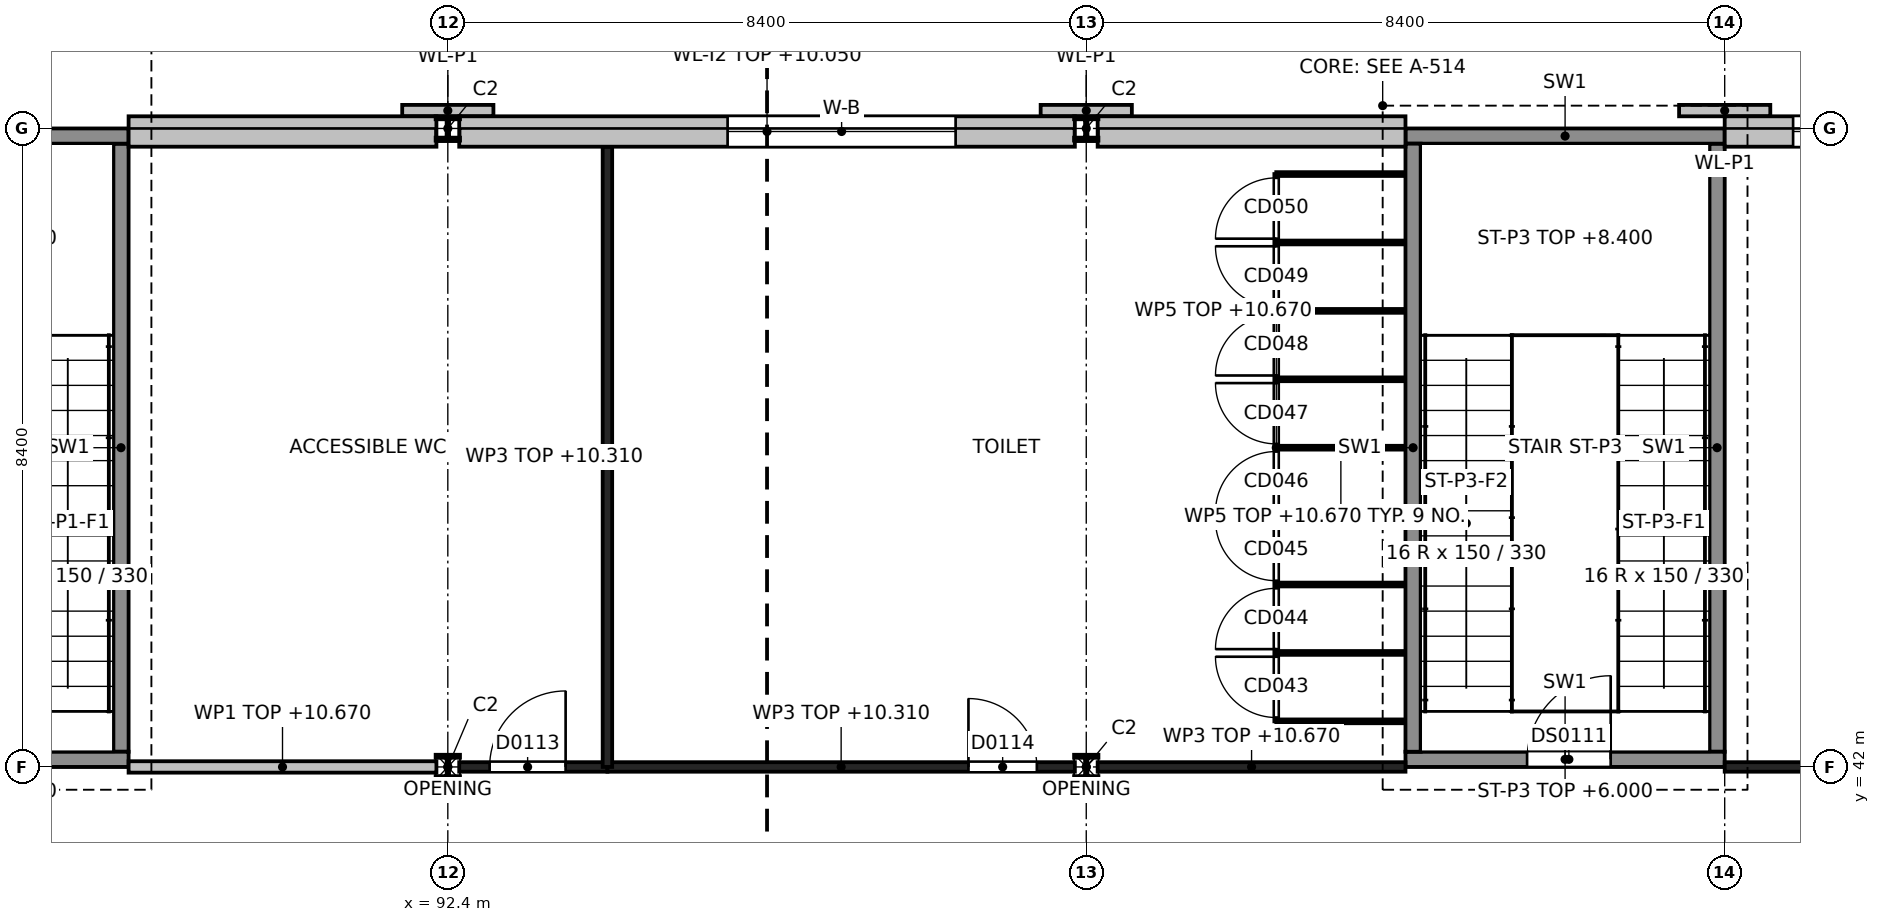
"""IFC4 building model, lengths in metres.
Left out: names, types, materials, properties, quantities, classifications, styles, units other than length and angle.
Written with IfcOpenShell. Run it as: python <this file> out.ifc"""

import sys

from ifc_helpers import new_model, si_unit, direction, frame, frame_2d, origin, origin_2d, place, context, subcontext, project, spatial, rectangle, i_section, extrude, element, fill, save


model = new_model("IFC4")
c1 = context("Model", 3, precision=1e-05, world=origin(), true_north=direction((0.0, 1.0)))
c2 = subcontext(c1, "Body", "Model", "MODEL_VIEW")
j1 = project(units=[si_unit("LENGTHUNIT", "METRE"), si_unit("PLANEANGLEUNIT", "RADIAN")], contexts=[c1])
p1 = place(None, origin())
s1 = spatial("IfcSite", under=j1, at=p1, CompositionType="ELEMENT")
p2 = place(p1, origin())
s2 = spatial("IfcBuilding", under=s1, at=p2, CompositionType="ELEMENT")
p3 = place(p2, frame((0.0, 0.0, 6.0)))
s3 = spatial("IfcBuildingStorey", under=s2, at=p3, CompositionType="ELEMENT", Elevation=6.0)
for number, where, z_axis, x_axis in (
    (1, (92.4, 42.0, 0.0), (0.0, 0.0, 1.0), (1.0, 0.0, 0.0)),
    (2, (92.4, 50.4, 0.0), (0.0, 0.0, 1.0), (1.0, 0.0, 0.0)),
    (3, (100.8, 42.0, 0.0), (0.0, 0.0, 1.0), (1.0, 0.0, 0.0)),
    (4, (100.8, 50.4, 0.0), (0.0, 0.0, 1.0), (1.0, 0.0, 0.0)),
):
    element("IfcColumn", number, at=place(p3, frame(where, z_axis=z_axis, x_axis=x_axis)), inside=s3, PredefinedType="COLUMN", context=c2, shape_type="SweptSolid", body=[
        extrude(i_section(OverallWidth=0.3, OverallDepth=0.3, WebThickness=0.011, FlangeThickness=0.019, at=origin_2d()), origin(), (0.0, 0.0, 1.0), 4.8),
    ])
p4 = place(p3, frame((84.0, 42.1, 0.0), z_axis=(0.0, 0.0, 1.0), x_axis=(1.0, 0.0, 0.0)))
e5 = element("IfcWall", 5, at=p4, inside=s3, PredefinedType="SHEAR", context=c2, shape_type="SweptSolid", body=[
    extrude(rectangle(XDim=4.2, YDim=0.2, at=frame_2d((2.1, 0.0))), origin(), (0.0, 0.0, 1.0), 4.8),
])
p5 = place(p4, frame((1.6, 0.0, 0.0)))
e6 = element("IfcOpeningElement", 6, at=p5, cuts=e5, PredefinedType="OPENING", context=c2, shape_type="SweptSolid", body=[
    extrude(rectangle(XDim=1.1, YDim=2.1, at=frame_2d((0.55, 1.05))), frame((0.0, 0.1, 0.0), z_axis=(0.0, -1.0, 0.0), x_axis=(1.0, 0.0, 0.0)), (0.0, 0.0, 1.0), 0.2),
])
p6 = place(p3, frame((84.0, 50.3, 0.0), z_axis=(0.0, 0.0, 1.0), x_axis=(1.0, 0.0, 0.0)))
e7 = element("IfcWall", 7, at=p6, inside=s3, PredefinedType="SHEAR", context=c2, shape_type="SweptSolid", body=[
    extrude(rectangle(XDim=4.2, YDim=0.2, at=frame_2d((2.1, 0.0))), origin(), (0.0, 0.0, 1.0), 4.8),
])
p7 = place(p3, frame((88.1, 42.2, 0.0), z_axis=(0.0, 0.0, 1.0), x_axis=(0.0, 1.0, 0.0)))
e8 = element("IfcWall", 8, at=p7, inside=s3, PredefinedType="SHEAR", context=c2, shape_type="SweptSolid", body=[
    extrude(rectangle(XDim=8.0, YDim=0.2, at=frame_2d((4.0, 0.0))), origin(), (0.0, 0.0, 1.0), 4.8),
])
p8 = place(p3, frame((105.0, 42.1, 0.0), z_axis=(0.0, 0.0, 1.0), x_axis=(1.0, 0.0, 0.0)))
e9 = element("IfcWall", 9, at=p8, inside=s3, PredefinedType="SHEAR", context=c2, shape_type="SweptSolid", body=[
    extrude(rectangle(XDim=4.2, YDim=0.2, at=frame_2d((2.1, 0.0))), origin(), (0.0, 0.0, 1.0), 4.8),
])
p9 = place(p8, frame((1.6, 0.0, 0.0)))
e10 = element("IfcOpeningElement", 10, at=p9, cuts=e9, PredefinedType="OPENING", context=c2, shape_type="SweptSolid", body=[
    extrude(rectangle(XDim=1.1, YDim=2.1, at=frame_2d((0.55, 1.05))), frame((0.0, 0.1, 0.0), z_axis=(0.0, -1.0, 0.0), x_axis=(1.0, 0.0, 0.0)), (0.0, 0.0, 1.0), 0.2),
])
p10 = place(p3, frame((105.0, 50.3, 0.0), z_axis=(0.0, 0.0, 1.0), x_axis=(1.0, 0.0, 0.0)))
e11 = element("IfcWall", 11, at=p10, inside=s3, PredefinedType="SHEAR", context=c2, shape_type="SweptSolid", body=[
    extrude(rectangle(XDim=4.2, YDim=0.2, at=frame_2d((2.1, 0.0))), origin(), (0.0, 0.0, 1.0), 4.8),
])
for number, where, z_axis, x_axis in (
    (12, (105.1, 42.2, 0.0), (0.0, 0.0, 1.0), (0.0, 1.0, 0.0)),
    (13, (109.1, 42.2, 0.0), (0.0, 0.0, 1.0), (0.0, 1.0, 0.0)),
):
    element("IfcWall", number, at=place(p3, frame(where, z_axis=z_axis, x_axis=x_axis)), inside=s3, PredefinedType="SHEAR", context=c2, shape_type="SweptSolid", body=[
        extrude(rectangle(XDim=8.0, YDim=0.2, at=frame_2d((4.0, 0.0))), origin(), (0.0, 0.0, 1.0), 4.8),
    ])
p11 = place(p3, frame((88.2, 50.36, 0.0), z_axis=(0.0, 0.0, 1.0), x_axis=(1.0, 0.0, 0.0)))
e14 = element("IfcWall", 14, at=p11, inside=s3, PredefinedType="SOLIDWALL", context=c2, shape_type="SweptSolid", body=[
    extrude(rectangle(XDim=4.05, YDim=0.4, at=frame_2d((2.025, 0.0))), origin(), (0.0, 0.0, 1.0), 4.05),
])
p12 = place(p3, frame((92.55, 50.36, 0.0), z_axis=(0.0, 0.0, 1.0), x_axis=(1.0, 0.0, 0.0)))
e15 = element("IfcWall", 15, at=p12, inside=s3, PredefinedType="SOLIDWALL", context=c2, shape_type="SweptSolid", body=[
    extrude(rectangle(XDim=8.1, YDim=0.4, at=frame_2d((4.05, 0.0))), origin(), (0.0, 0.0, 1.0), 4.05),
])
p13 = place(p12, frame((3.531, 0.0, 0.9)))
e16 = element("IfcOpeningElement", 16, at=p13, cuts=e15, PredefinedType="OPENING", context=c2, shape_type="SweptSolid", body=[
    extrude(rectangle(XDim=3.0, YDim=3.0, at=frame_2d((1.5, 1.5))), frame((0.0, 0.2, 0.0), z_axis=(0.0, -1.0, 0.0), x_axis=(1.0, 0.0, 0.0)), (0.0, 0.0, 1.0), 0.4),
])
p14 = place(p3, frame((100.95, 50.36, 0.0), z_axis=(0.0, 0.0, 1.0), x_axis=(1.0, 0.0, 0.0)))
e17 = element("IfcWall", 17, at=p14, inside=s3, PredefinedType="SOLIDWALL", context=c2, shape_type="SweptSolid", body=[
    extrude(rectangle(XDim=4.05, YDim=0.4, at=frame_2d((2.025, 0.0))), origin(), (0.0, 0.0, 1.0), 4.05),
])
p15 = place(p3, frame((109.2, 50.36, 0.0), z_axis=(0.0, 0.0, 1.0), x_axis=(1.0, 0.0, 0.0)))
e18 = element("IfcWall", 18, at=p15, inside=s3, PredefinedType="SOLIDWALL", context=c2, shape_type="SweptSolid", body=[
    extrude(rectangle(XDim=8.25, YDim=0.4, at=frame_2d((4.125, 0.0))), origin(), (0.0, 0.0, 1.0), 4.05),
])
p16 = place(p15, frame((0.9, 0.0, 0.9)))
e19 = element("IfcOpeningElement", 19, at=p16, cuts=e18, PredefinedType="OPENING", context=c2, shape_type="SweptSolid", body=[
    extrude(rectangle(XDim=3.0, YDim=3.0, at=frame_2d((1.5, 1.5))), frame((0.0, 0.2, 0.0), z_axis=(0.0, -1.0, 0.0), x_axis=(1.0, 0.0, 0.0)), (0.0, 0.0, 1.0), 0.4),
])
p17 = place(p15, frame((4.5, 0.0, 0.9)))
e20 = element("IfcOpeningElement", 20, at=p17, cuts=e18, PredefinedType="OPENING", context=c2, shape_type="SweptSolid", body=[
    extrude(rectangle(XDim=3.0, YDim=3.0, at=frame_2d((1.5, 1.5))), frame((0.0, 0.2, 0.0), z_axis=(0.0, -1.0, 0.0), x_axis=(1.0, 0.0, 0.0)), (0.0, 0.0, 1.0), 0.4),
])
for number, where, z_axis, x_axis in (
    (21, (91.8, 50.635, 0.0), (0.0, 0.0, 1.0), (1.0, 0.0, 0.0)),
    (22, (100.2, 50.635, 0.0), (0.0, 0.0, 1.0), (1.0, 0.0, 0.0)),
    (23, (108.6, 50.635, 0.0), (0.0, 0.0, 1.0), (1.0, 0.0, 0.0)),
):
    element("IfcWall", number, at=place(p3, frame(where, z_axis=z_axis, x_axis=x_axis)), inside=s3, PredefinedType="SOLIDWALL", context=c2, shape_type="SweptSolid", body=[
        extrude(rectangle(XDim=1.2, YDim=0.15, at=frame_2d((0.6, 0.0))), origin(), (0.0, 0.0, 1.0), 4.8),
    ])
p18 = place(p3, frame((88.2, 42.0, 0.0), z_axis=(0.0, 0.0, 1.0), x_axis=(1.0, 0.0, 0.0)))
e24 = element("IfcWall", 24, at=p18, inside=s3, PredefinedType="PARTITIONING", context=c2, shape_type="SweptSolid", body=[
    extrude(rectangle(XDim=4.05, YDim=0.15, at=frame_2d((2.025, 0.0))), origin(), (0.0, 0.0, 1.0), 4.67),
])
p19 = place(p3, frame((92.55, 42.0, 0.0), z_axis=(0.0, 0.0, 1.0), x_axis=(1.0, 0.0, 0.0)))
e25 = element("IfcWall", 25, at=p19, inside=s3, PredefinedType="PARTITIONING", context=c2, shape_type="SweptSolid", body=[
    extrude(rectangle(XDim=1.95, YDim=0.125, at=frame_2d((0.975, 0.0))), origin(), (0.0, 0.0, 1.0), 4.31),
])
p20 = place(p19, frame((0.4, 0.0, 0.0)))
e26 = element("IfcOpeningElement", 26, at=p20, cuts=e25, PredefinedType="OPENING", context=c2, shape_type="SweptSolid", body=[
    extrude(rectangle(XDim=1.0, YDim=2.1, at=frame_2d((0.5, 1.05))), frame((0.0, 0.062, 0.0), z_axis=(0.0, -1.0, 0.0), x_axis=(1.0, 0.0, 0.0)), (0.0, 0.0, 1.0), 0.125),
])
p21 = place(p3, frame((94.5, 42.0, 0.0), z_axis=(0.0, 0.0, 1.0), x_axis=(1.0, 0.0, 0.0)))
e27 = element("IfcWall", 27, at=p21, inside=s3, PredefinedType="PARTITIONING", context=c2, shape_type="SweptSolid", body=[
    extrude(rectangle(XDim=6.15, YDim=0.125, at=frame_2d((3.075, 0.0))), origin(), (0.0, 0.0, 1.0), 4.31),
])
p22 = place(p21, frame((4.75, 0.0, 0.0)))
e28 = element("IfcOpeningElement", 28, at=p22, cuts=e27, PredefinedType="OPENING", context=c2, shape_type="SweptSolid", body=[
    extrude(rectangle(XDim=0.9, YDim=2.1, at=frame_2d((0.45, 1.05))), frame((0.0, 0.062, 0.0), z_axis=(0.0, -1.0, 0.0), x_axis=(1.0, 0.0, 0.0)), (0.0, 0.0, 1.0), 0.125),
])
p23 = place(p3, frame((100.95, 42.0, 0.0), z_axis=(0.0, 0.0, 1.0), x_axis=(1.0, 0.0, 0.0)))
e29 = element("IfcWall", 29, at=p23, inside=s3, PredefinedType="PARTITIONING", context=c2, shape_type="SweptSolid", body=[
    extrude(rectangle(XDim=4.05, YDim=0.125, at=frame_2d((2.025, 0.0))), origin(), (0.0, 0.0, 1.0), 4.67),
])
p24 = place(p3, frame((109.2, 42.0, 0.0), z_axis=(0.0, 0.0, 1.0), x_axis=(1.0, 0.0, 0.0)))
e30 = element("IfcWall", 30, at=p24, inside=s3, PredefinedType="PARTITIONING", context=c2, shape_type="SweptSolid", body=[
    extrude(rectangle(XDim=8.25, YDim=0.125, at=frame_2d((4.125, 0.0))), origin(), (0.0, 0.0, 1.0), 4.28),
])
p25 = place(p24, frame((3.25, 0.0, 0.0)))
e31 = element("IfcOpeningElement", 31, at=p25, cuts=e30, PredefinedType="OPENING", context=c2, shape_type="SweptSolid", body=[
    extrude(rectangle(XDim=1.8, YDim=2.1, at=frame_2d((0.9, 1.05))), frame((0.0, 0.062, 0.0), z_axis=(0.0, -1.0, 0.0), x_axis=(1.0, 0.0, 0.0)), (0.0, 0.0, 1.0), 0.125),
])
p26 = place(p3, frame((94.5, 42.0, 0.0), z_axis=(0.0, 0.0, 1.0), x_axis=(0.0, 1.0, 0.0)))
e32 = element("IfcWall", 32, at=p26, inside=s3, PredefinedType="PARTITIONING", context=c2, shape_type="SweptSolid", body=[
    extrude(rectangle(XDim=8.159, YDim=0.125, at=frame_2d((4.08, 0.0))), origin(), (0.0, 0.0, 1.0), 4.31),
])
p27 = place(p3, frame((103.3, 42.6, 0.0), z_axis=(0.0, 0.0, 1.0), x_axis=(0.0, 1.0, 0.0)))
e33 = element("IfcWall", 33, at=p27, inside=s3, PredefinedType="PARTITIONING", context=c2, shape_type="SweptSolid", body=[
    extrude(rectangle(XDim=7.2, YDim=0.05, at=frame_2d((3.6, 0.0))), origin(), (0.0, 0.0, 1.0), 4.67),
])
p28 = place(p27, frame((0.05, 0.0, 0.0)))
e34 = element("IfcOpeningElement", 34, at=p28, cuts=e33, PredefinedType="OPENING", context=c2, shape_type="SweptSolid", body=[
    extrude(rectangle(XDim=0.8, YDim=2.0, at=frame_2d((0.4, 1.0))), frame((0.0, 0.025, 0.0), z_axis=(0.0, -1.0, 0.0), x_axis=(1.0, 0.0, 0.0)), (0.0, 0.0, 1.0), 0.05),
])
p29 = place(p27, frame((0.95, 0.0, 0.0)))
e35 = element("IfcOpeningElement", 35, at=p29, cuts=e33, PredefinedType="OPENING", context=c2, shape_type="SweptSolid", body=[
    extrude(rectangle(XDim=0.8, YDim=2.0, at=frame_2d((0.4, 1.0))), frame((0.0, 0.025, 0.0), z_axis=(0.0, -1.0, 0.0), x_axis=(1.0, 0.0, 0.0)), (0.0, 0.0, 1.0), 0.05),
])
p30 = place(p27, frame((1.85, 0.0, 0.0)))
e36 = element("IfcOpeningElement", 36, at=p30, cuts=e33, PredefinedType="OPENING", context=c2, shape_type="SweptSolid", body=[
    extrude(rectangle(XDim=0.8, YDim=2.0, at=frame_2d((0.4, 1.0))), frame((0.0, 0.025, 0.0), z_axis=(0.0, -1.0, 0.0), x_axis=(1.0, 0.0, 0.0)), (0.0, 0.0, 1.0), 0.05),
])
p31 = place(p27, frame((2.75, 0.0, 0.0)))
e37 = element("IfcOpeningElement", 37, at=p31, cuts=e33, PredefinedType="OPENING", context=c2, shape_type="SweptSolid", body=[
    extrude(rectangle(XDim=0.8, YDim=2.0, at=frame_2d((0.4, 1.0))), frame((0.0, 0.025, 0.0), z_axis=(0.0, -1.0, 0.0), x_axis=(1.0, 0.0, 0.0)), (0.0, 0.0, 1.0), 0.05),
])
p32 = place(p27, frame((3.65, 0.0, 0.0)))
e38 = element("IfcOpeningElement", 38, at=p32, cuts=e33, PredefinedType="OPENING", context=c2, shape_type="SweptSolid", body=[
    extrude(rectangle(XDim=0.8, YDim=2.0, at=frame_2d((0.4, 1.0))), frame((0.0, 0.025, 0.0), z_axis=(0.0, -1.0, 0.0), x_axis=(1.0, 0.0, 0.0)), (0.0, 0.0, 1.0), 0.05),
])
p33 = place(p27, frame((4.55, 0.0, 0.0)))
e39 = element("IfcOpeningElement", 39, at=p33, cuts=e33, PredefinedType="OPENING", context=c2, shape_type="SweptSolid", body=[
    extrude(rectangle(XDim=0.8, YDim=2.0, at=frame_2d((0.4, 1.0))), frame((0.0, 0.025, 0.0), z_axis=(0.0, -1.0, 0.0), x_axis=(1.0, 0.0, 0.0)), (0.0, 0.0, 1.0), 0.05),
])
p34 = place(p27, frame((5.45, 0.0, 0.0)))
e40 = element("IfcOpeningElement", 40, at=p34, cuts=e33, PredefinedType="OPENING", context=c2, shape_type="SweptSolid", body=[
    extrude(rectangle(XDim=0.8, YDim=2.0, at=frame_2d((0.4, 1.0))), frame((0.0, 0.025, 0.0), z_axis=(0.0, -1.0, 0.0), x_axis=(1.0, 0.0, 0.0)), (0.0, 0.0, 1.0), 0.05),
])
p35 = place(p27, frame((6.35, 0.0, 0.0)))
e41 = element("IfcOpeningElement", 41, at=p35, cuts=e33, PredefinedType="OPENING", context=c2, shape_type="SweptSolid", body=[
    extrude(rectangle(XDim=0.8, YDim=2.0, at=frame_2d((0.4, 1.0))), frame((0.0, 0.025, 0.0), z_axis=(0.0, -1.0, 0.0), x_axis=(1.0, 0.0, 0.0)), (0.0, 0.0, 1.0), 0.05),
])
for number, where, z_axis, x_axis in (
    (42, (105.0, 42.6, 0.0), (0.0, 0.0, 1.0), (-1.0, 0.0, 0.0)),
    (43, (105.0, 43.5, 0.0), (0.0, 0.0, 1.0), (-1.0, 0.0, 0.0)),
    (44, (105.0, 44.4, 0.0), (0.0, 0.0, 1.0), (-1.0, 0.0, 0.0)),
    (45, (105.0, 45.3, 0.0), (0.0, 0.0, 1.0), (-1.0, 0.0, 0.0)),
    (46, (105.0, 46.2, 0.0), (0.0, 0.0, 1.0), (-1.0, 0.0, 0.0)),
    (47, (105.0, 47.1, 0.0), (0.0, 0.0, 1.0), (-1.0, 0.0, 0.0)),
    (48, (105.0, 48.0, 0.0), (0.0, 0.0, 1.0), (-1.0, 0.0, 0.0)),
    (49, (105.0, 48.9, 0.0), (0.0, 0.0, 1.0), (-1.0, 0.0, 0.0)),
    (50, (105.0, 49.8, 0.0), (0.0, 0.0, 1.0), (-1.0, 0.0, 0.0)),
):
    element("IfcWall", number, at=place(p3, frame(where, z_axis=z_axis, x_axis=x_axis)), inside=s3, PredefinedType="PARTITIONING", context=c2, shape_type="SweptSolid", body=[
        extrude(rectangle(XDim=1.7, YDim=0.05, at=frame_2d((0.85, 0.0))), origin(), (0.0, 0.0, 1.0), 4.67),
    ])
p36 = place(p13, origin())
e51 = element("IfcWindow", 51, at=p36, inside=s3, PartitioningType="SINGLE_PANEL", PredefinedType="WINDOW", context=c2, shape_type="SweptSolid", body=[
    extrude(rectangle(XDim=3.0, YDim=3.0, at=frame_2d((1.5, 1.5))), frame((0.0, 0.03, 0.0), z_axis=(0.0, -1.0, 0.0), x_axis=(1.0, 0.0, 0.0)), (0.0, 0.0, 1.0), 0.06),
])
fill(e16, e51)
p37 = place(p16, origin())
e52 = element("IfcWindow", 52, at=p37, inside=s3, PartitioningType="SINGLE_PANEL", PredefinedType="WINDOW", context=c2, shape_type="SweptSolid", body=[
    extrude(rectangle(XDim=3.0, YDim=3.0, at=frame_2d((1.5, 1.5))), frame((0.0, 0.03, 0.0), z_axis=(0.0, -1.0, 0.0), x_axis=(1.0, 0.0, 0.0)), (0.0, 0.0, 1.0), 0.06),
])
fill(e19, e52)
p38 = place(p20, origin())
e53 = element("IfcDoor", 53, at=p38, inside=s3, OperationType="SINGLE_SWING_RIGHT", PredefinedType="DOOR", context=c2, shape_type="SweptSolid", body=[
    extrude(rectangle(XDim=1.0, YDim=2.1, at=frame_2d((0.5, 1.05))), frame((0.0, 0.025, 0.0), z_axis=(0.0, -1.0, 0.0), x_axis=(1.0, 0.0, 0.0)), (0.0, 0.0, 1.0), 0.05),
])
fill(e26, e53)
p39 = place(p22, origin())
e54 = element("IfcDoor", 54, at=p39, inside=s3, OperationType="SINGLE_SWING_LEFT", PredefinedType="DOOR", context=c2, shape_type="SweptSolid", body=[
    extrude(rectangle(XDim=0.9, YDim=2.1, at=frame_2d((0.45, 1.05))), frame((0.0, 0.025, 0.0), z_axis=(0.0, -1.0, 0.0), x_axis=(1.0, 0.0, 0.0)), (0.0, 0.0, 1.0), 0.05),
])
fill(e28, e54)
p40 = place(p9, origin())
e55 = element("IfcDoor", 55, at=p40, inside=s3, OperationType="SINGLE_SWING_RIGHT", PredefinedType="DOOR", context=c2, shape_type="SweptSolid", body=[
    extrude(rectangle(XDim=1.1, YDim=2.1, at=frame_2d((0.55, 1.05))), frame((0.0, 0.025, 0.0), z_axis=(0.0, -1.0, 0.0), x_axis=(1.0, 0.0, 0.0)), (0.0, 0.0, 1.0), 0.05),
])
fill(e10, e55)
p41 = place(p28, origin())
e56 = element("IfcDoor", 56, at=p41, inside=s3, OperationType="SINGLE_SWING_RIGHT", PredefinedType="DOOR", context=c2, shape_type="SweptSolid", body=[
    extrude(rectangle(XDim=0.8, YDim=2.0, at=frame_2d((0.4, 1.0))), frame((0.0, 0.025, 0.0), z_axis=(0.0, -1.0, 0.0), x_axis=(1.0, 0.0, 0.0)), (0.0, 0.0, 1.0), 0.05),
])
fill(e34, e56)
p42 = place(p29, origin())
e57 = element("IfcDoor", 57, at=p42, inside=s3, OperationType="SINGLE_SWING_LEFT", PredefinedType="DOOR", context=c2, shape_type="SweptSolid", body=[
    extrude(rectangle(XDim=0.8, YDim=2.0, at=frame_2d((0.4, 1.0))), frame((0.0, 0.025, 0.0), z_axis=(0.0, -1.0, 0.0), x_axis=(1.0, 0.0, 0.0)), (0.0, 0.0, 1.0), 0.05),
])
fill(e35, e57)
p43 = place(p30, origin())
e58 = element("IfcDoor", 58, at=p43, inside=s3, OperationType="SINGLE_SWING_RIGHT", PredefinedType="DOOR", context=c2, shape_type="SweptSolid", body=[
    extrude(rectangle(XDim=0.8, YDim=2.0, at=frame_2d((0.4, 1.0))), frame((0.0, 0.025, 0.0), z_axis=(0.0, -1.0, 0.0), x_axis=(1.0, 0.0, 0.0)), (0.0, 0.0, 1.0), 0.05),
])
fill(e36, e58)
p44 = place(p31, origin())
e59 = element("IfcDoor", 59, at=p44, inside=s3, OperationType="SINGLE_SWING_LEFT", PredefinedType="DOOR", context=c2, shape_type="SweptSolid", body=[
    extrude(rectangle(XDim=0.8, YDim=2.0, at=frame_2d((0.4, 1.0))), frame((0.0, 0.025, 0.0), z_axis=(0.0, -1.0, 0.0), x_axis=(1.0, 0.0, 0.0)), (0.0, 0.0, 1.0), 0.05),
])
fill(e37, e59)
p45 = place(p32, origin())
e60 = element("IfcDoor", 60, at=p45, inside=s3, OperationType="SINGLE_SWING_RIGHT", PredefinedType="DOOR", context=c2, shape_type="SweptSolid", body=[
    extrude(rectangle(XDim=0.8, YDim=2.0, at=frame_2d((0.4, 1.0))), frame((0.0, 0.025, 0.0), z_axis=(0.0, -1.0, 0.0), x_axis=(1.0, 0.0, 0.0)), (0.0, 0.0, 1.0), 0.05),
])
fill(e38, e60)
p46 = place(p33, origin())
e61 = element("IfcDoor", 61, at=p46, inside=s3, OperationType="SINGLE_SWING_LEFT", PredefinedType="DOOR", context=c2, shape_type="SweptSolid", body=[
    extrude(rectangle(XDim=0.8, YDim=2.0, at=frame_2d((0.4, 1.0))), frame((0.0, 0.025, 0.0), z_axis=(0.0, -1.0, 0.0), x_axis=(1.0, 0.0, 0.0)), (0.0, 0.0, 1.0), 0.05),
])
fill(e39, e61)
p47 = place(p34, origin())
e62 = element("IfcDoor", 62, at=p47, inside=s3, OperationType="SINGLE_SWING_RIGHT", PredefinedType="DOOR", context=c2, shape_type="SweptSolid", body=[
    extrude(rectangle(XDim=0.8, YDim=2.0, at=frame_2d((0.4, 1.0))), frame((0.0, 0.025, 0.0), z_axis=(0.0, -1.0, 0.0), x_axis=(1.0, 0.0, 0.0)), (0.0, 0.0, 1.0), 0.05),
])
fill(e40, e62)
p48 = place(p35, origin())
e63 = element("IfcDoor", 63, at=p48, inside=s3, OperationType="SINGLE_SWING_LEFT", PredefinedType="DOOR", context=c2, shape_type="SweptSolid", body=[
    extrude(rectangle(XDim=0.8, YDim=2.0, at=frame_2d((0.4, 1.0))), frame((0.0, 0.025, 0.0), z_axis=(0.0, -1.0, 0.0), x_axis=(1.0, 0.0, 0.0)), (0.0, 0.0, 1.0), 0.05),
])
fill(e41, e63)
save(model, sys.argv[1])
